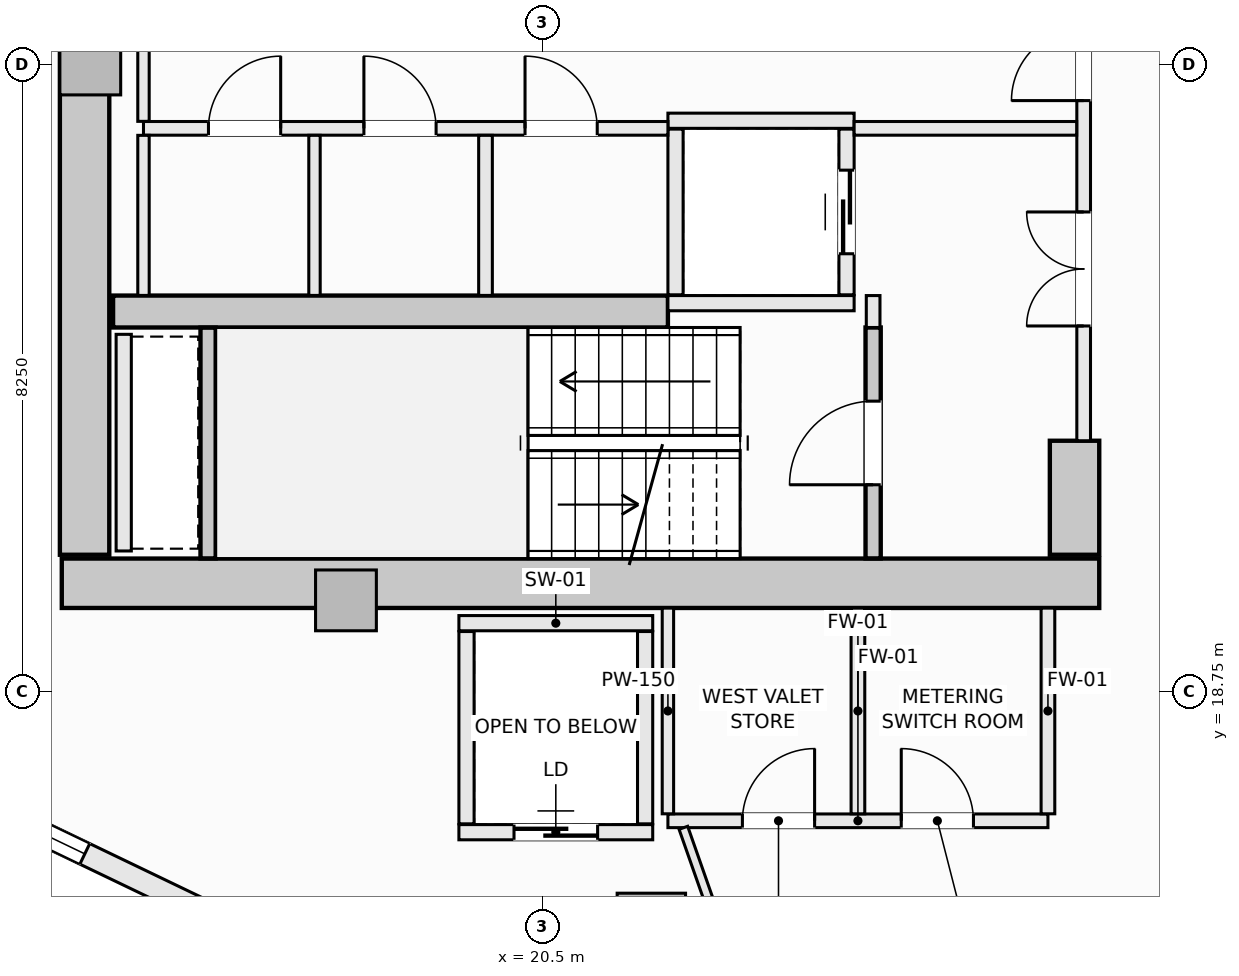
"""IFC4 building model, lengths in metres.
Left out: names, types, materials, properties, quantities, classifications, styles, units other than length and angle.
Written with IfcOpenShell. Run it as: python <this file> out.ifc"""

import sys

from ifc_helpers import new_model, si_unit, direction, frame, frame_2d, origin, origin_2d, place, context, subcontext, project, spatial, rectangle, extrude, element, fill, save


model = new_model("IFC4")
c1 = context("Model", 3, precision=1e-05, world=origin(), true_north=direction((0.0, 1.0)))
c2 = subcontext(c1, "Body", "Model", "MODEL_VIEW")
j1 = project(units=[si_unit("LENGTHUNIT", "METRE"), si_unit("PLANEANGLEUNIT", "RADIAN")], contexts=[c1])
p1 = place(None, origin())
s1 = spatial("IfcSite", under=j1, at=p1, CompositionType="ELEMENT")
p2 = place(p1, origin())
s2 = spatial("IfcBuilding", under=s1, at=p2, CompositionType="ELEMENT")
p3 = place(p2, frame((0.0, 0.0, 152.9)))
s3 = spatial("IfcBuildingStorey", under=s2, at=p3, CompositionType="ELEMENT", Elevation=152.9)
p4 = place(p3, frame((14.175, 20.175, -0.27), z_axis=(0.0, 0.0, 1.0), x_axis=(1.0, 0.0, 0.0)))
e1 = element("IfcWall", 1, at=p4, inside=s3, PredefinedType="SHEAR", context=c2, shape_type="SweptSolid", body=[
    extrude(rectangle(XDim=13.65, YDim=0.65, at=frame_2d((6.825, 0.0))), origin(), (0.0, 0.0, 1.0), 3.4),
])
p5 = place(p3, frame((14.475, 20.55, -0.27), z_axis=(0.0, 0.0, 1.0), x_axis=(0.0, 1.0, 0.0)))
e2 = element("IfcWall", 2, at=p5, inside=s3, PredefinedType="SHEAR", context=c2, shape_type="SweptSolid", body=[
    extrude(rectangle(XDim=12.9, YDim=0.65, at=frame_2d((6.45, 0.0))), origin(), (0.0, 0.0, 1.0), 3.4),
])
p6 = place(p3, frame((27.5, 20.55, -0.27), z_axis=(0.0, 0.0, 1.0), x_axis=(0.0, 1.0, 0.0)))
e3 = element("IfcWall", 3, at=p6, inside=s3, PredefinedType="SHEAR", context=c2, shape_type="SweptSolid", body=[
    extrude(rectangle(XDim=1.5, YDim=0.65, at=frame_2d((0.75, 0.0))), origin(), (0.0, 0.0, 1.0), 3.4),
])
p7 = place(p3, frame((14.85, 23.75, -0.27), z_axis=(0.0, 0.0, 1.0), x_axis=(1.0, 0.0, 0.0)))
e4 = element("IfcWall", 4, at=p7, inside=s3, PredefinedType="SHEAR", context=c2, shape_type="SweptSolid", body=[
    extrude(rectangle(XDim=7.3, YDim=0.42, at=frame_2d((3.65, 0.0))), origin(), (0.0, 0.0, 1.0), 3.4),
])
p8 = place(p3, frame((21.932, 15.648, -0.27), z_axis=(0.0, 0.0, 1.0), x_axis=(1.0, 0.0, 0.0)))
e5 = element("IfcColumn", 5, at=p8, inside=s3, PredefinedType="COLUMN", context=c2, shape_type="SweptSolid", body=[
    extrude(rectangle(XDim=0.9, YDim=0.9, at=origin_2d()), origin(), (0.0, 0.0, 1.0), 3.4),
])
for number, where, z_axis, x_axis in (
    (6, (14.55, 27.0, -0.27), (0.0, 0.0, 1.0), (1.0, 0.0, 0.0)),
    (7, (17.914, 19.95, -0.27), (0.0, 0.0, 1.0), (1.0, 0.0, 0.0)),
):
    element("IfcColumn", number, at=place(p3, frame(where, z_axis=z_axis, x_axis=x_axis)), inside=s3, PredefinedType="PILASTER", context=c2, shape_type="SweptSolid", body=[
        extrude(rectangle(XDim=0.8, YDim=0.8, at=origin_2d()), origin(), (0.0, 0.0, 1.0), 3.4),
    ])
p9 = place(p3, frame((11.127, 18.225, 0.0), z_axis=(0.0, 0.0, 1.0), x_axis=(0.901353070301, -0.433085029363, 0.0)))
e8 = element("IfcWall", 8, at=p9, inside=s3, PredefinedType="SOLIDWALL", context=c2, shape_type="SweptSolid", body=[
    extrude(rectangle(XDim=5.336, YDim=0.3, at=frame_2d((2.668, 0.0))), origin(), (0.0, 0.0, 1.0), 2.653),
])
p10 = place(p9, frame((1.618, 0.0, 0.74)))
e9 = element("IfcOpeningElement", 9, at=p10, cuts=e8, PredefinedType="OPENING", context=c2, shape_type="SweptSolid", body=[
    extrude(rectangle(XDim=2.1, YDim=1.7, at=frame_2d((1.05, 0.85))), frame((0.0, 0.16, 0.0), z_axis=(0.0, -1.0, 0.0), x_axis=(1.0, 0.0, 0.0)), (0.0, 0.0, 1.0), 0.32),
])
p11 = place(p3, frame((24.85, 20.502, -0.27), z_axis=(0.0, 0.0, 1.0), x_axis=(0.0, 1.0, 0.0)))
e10 = element("IfcWall", 10, at=p11, inside=s3, PredefinedType="SHEAR", context=c2, shape_type="SweptSolid", body=[
    extrude(rectangle(XDim=3.038, YDim=0.2, at=frame_2d((1.519, 0.0))), origin(), (0.0, 0.0, 1.0), 3.4),
])
p12 = place(p11, frame((0.969, 0.0, 0.27)))
e11 = element("IfcOpeningElement", 11, at=p12, cuts=e10, PredefinedType="OPENING", context=c2, shape_type="SweptSolid", body=[
    extrude(rectangle(XDim=1.1, YDim=2.15, at=frame_2d((0.55, 1.075))), frame((0.0, 0.11, 0.0), z_axis=(0.0, -1.0, 0.0), x_axis=(1.0, 0.0, 0.0)), (0.0, 0.0, 1.0), 0.22),
])
p13 = place(p3, frame((16.1, 20.502, -0.27), z_axis=(0.0, 0.0, 1.0), x_axis=(0.0, 1.0, 0.0)))
e12 = element("IfcWall", 12, at=p13, inside=s3, PredefinedType="SHEAR", context=c2, shape_type="SweptSolid", body=[
    extrude(rectangle(XDim=3.036, YDim=0.2, at=frame_2d((1.518, 0.0))), origin(), (0.0, 0.0, 1.0), 3.4),
])
for number, where, z_axis, x_axis in (
    (13, (22.15, 26.26, 0.0), (0.0, 0.0, 1.0), (1.0, 0.0, 0.0)),
    (14, (22.15, 23.86, 0.0), (0.0, 0.0, 1.0), (1.0, 0.0, 0.0)),
):
    element("IfcWall", number, at=place(p3, frame(where, z_axis=z_axis, x_axis=x_axis)), inside=s3, PredefinedType="SOLIDWALL", context=c2, shape_type="SweptSolid", body=[
        extrude(rectangle(XDim=2.45, YDim=0.2, at=frame_2d((1.225, 0.0))), origin(), (0.0, 0.0, 1.0), 3.13),
    ])
p14 = place(p3, frame((22.25, 23.97, 0.0), z_axis=(0.0, 0.0, 1.0), x_axis=(0.0, 1.0, 0.0)))
e15 = element("IfcWall", 15, at=p14, inside=s3, PredefinedType="SOLIDWALL", context=c2, shape_type="SweptSolid", body=[
    extrude(rectangle(XDim=2.18, YDim=0.2, at=frame_2d((1.09, 0.0))), origin(), (0.0, 0.0, 1.0), 3.13),
])
p15 = place(p3, frame((24.5, 23.97, 0.0), z_axis=(0.0, 0.0, 1.0), x_axis=(0.0, 1.0, 0.0)))
e16 = element("IfcWall", 16, at=p15, inside=s3, PredefinedType="SOLIDWALL", context=c2, shape_type="SweptSolid", body=[
    extrude(rectangle(XDim=2.18, YDim=0.2, at=frame_2d((1.09, 0.0))), origin(), (0.0, 0.0, 1.0), 3.13),
])
p16 = place(p15, frame((0.54, 0.0, 0.0)))
e17 = element("IfcOpeningElement", 17, at=p16, cuts=e16, PredefinedType="OPENING", context=c2, shape_type="SweptSolid", body=[
    extrude(rectangle(XDim=1.1, YDim=2.2, at=frame_2d((0.55, 1.1))), frame((0.0, 0.11, 0.0), z_axis=(0.0, -1.0, 0.0), x_axis=(1.0, 0.0, 0.0)), (0.0, 0.0, 1.0), 0.22),
])
p17 = place(p3, frame((19.4, 19.65, 0.0), z_axis=(0.0, 0.0, 1.0), x_axis=(1.0, 0.0, 0.0)))
e18 = element("IfcWall", 18, at=p17, inside=s3, PredefinedType="SOLIDWALL", context=c2, shape_type="SweptSolid", body=[
    extrude(rectangle(XDim=2.55, YDim=0.2, at=frame_2d((1.275, 0.0))), origin(), (0.0, 0.0, 1.0), 3.13),
])
p18 = place(p3, frame((19.4, 16.9, 0.0), z_axis=(0.0, 0.0, 1.0), x_axis=(1.0, 0.0, 0.0)))
e19 = element("IfcWall", 19, at=p18, inside=s3, PredefinedType="SOLIDWALL", context=c2, shape_type="SweptSolid", body=[
    extrude(rectangle(XDim=2.55, YDim=0.2, at=frame_2d((1.275, 0.0))), origin(), (0.0, 0.0, 1.0), 3.13),
])
p19 = place(p18, frame((0.725, 0.0, 0.0)))
e20 = element("IfcOpeningElement", 20, at=p19, cuts=e19, PredefinedType="OPENING", context=c2, shape_type="SweptSolid", body=[
    extrude(rectangle(XDim=1.1, YDim=2.2, at=frame_2d((0.55, 1.1))), frame((0.0, 0.11, 0.0), z_axis=(0.0, -1.0, 0.0), x_axis=(1.0, 0.0, 0.0)), (0.0, 0.0, 1.0), 0.22),
])
for number, where, z_axis, x_axis in (
    (21, (19.5, 17.01, 0.0), (0.0, 0.0, 1.0), (0.0, 1.0, 0.0)),
    (22, (21.85, 17.01, 0.0), (0.0, 0.0, 1.0), (0.0, 1.0, 0.0)),
):
    element("IfcWall", number, at=place(p3, frame(where, z_axis=z_axis, x_axis=x_axis)), inside=s3, PredefinedType="SOLIDWALL", context=c2, shape_type="SweptSolid", body=[
        extrude(rectangle(XDim=2.53, YDim=0.2, at=frame_2d((1.265, 0.0))), origin(), (0.0, 0.0, 1.0), 3.13),
    ])
p20 = place(p3, frame((14.99, 20.6, 0.0), z_axis=(0.0, 0.0, 1.0), x_axis=(0.0, 1.0, 0.0)))
e23 = element("IfcWall", 23, at=p20, inside=s3, PredefinedType="SOLIDWALL", context=c2, shape_type="SweptSolid", body=[
    extrude(rectangle(XDim=2.85, YDim=0.2, at=frame_2d((1.425, 0.0))), origin(), (0.0, 0.0, 1.0), 3.13),
])
p21 = place(p3, frame((24.85, 23.54, 0.0), z_axis=(0.0, 0.0, 1.0), x_axis=(0.0, 1.0, 0.0)))
e24 = element("IfcWall", 24, at=p21, inside=s3, PredefinedType="SOLIDWALL", context=c2, shape_type="SweptSolid", body=[
    extrude(rectangle(XDim=0.42, YDim=0.18, at=frame_2d((0.21, 0.0))), origin(), (0.0, 0.0, 1.0), 3.13),
])
p22 = place(p3, frame((27.62, 22.05, 0.0), z_axis=(0.0, 0.0, 1.0), x_axis=(0.0, 1.0, 0.0)))
e25 = element("IfcWall", 25, at=p22, inside=s3, PredefinedType="SOLIDWALL", context=c2, shape_type="SweptSolid", body=[
    extrude(rectangle(XDim=9.9, YDim=0.18, at=frame_2d((4.95, 0.0))), origin(), (0.0, 0.0, 1.0), 3.13),
])
p23 = place(p22, frame((4.475, 0.0, 0.0)))
e26 = element("IfcOpeningElement", 26, at=p23, cuts=e25, PredefinedType="OPENING", context=c2, shape_type="SweptSolid", body=[
    extrude(rectangle(XDim=0.95, YDim=2.1, at=frame_2d((0.475, 1.05))), frame((0.0, 0.1, 0.0), z_axis=(0.0, -1.0, 0.0), x_axis=(1.0, 0.0, 0.0)), (0.0, 0.0, 1.0), 0.2),
])
p24 = place(p22, frame((6.89, 0.0, 0.0)))
e27 = element("IfcOpeningElement", 27, at=p24, cuts=e25, PredefinedType="OPENING", context=c2, shape_type="SweptSolid", body=[
    extrude(rectangle(XDim=1.5, YDim=2.2, at=frame_2d((0.75, 1.1))), frame((0.0, 0.1, 0.0), z_axis=(0.0, -1.0, 0.0), x_axis=(1.0, 0.0, 0.0)), (0.0, 0.0, 1.0), 0.2),
])
p25 = place(p22, frame((1.51, 0.0, 0.0)))
e28 = element("IfcOpeningElement", 28, at=p25, cuts=e25, PredefinedType="OPENING", context=c2, shape_type="SweptSolid", body=[
    extrude(rectangle(XDim=1.5, YDim=2.2, at=frame_2d((0.75, 1.1))), frame((0.0, 0.1, 0.0), z_axis=(0.0, -1.0, 0.0), x_axis=(1.0, 0.0, 0.0)), (0.0, 0.0, 1.0), 0.2),
])
p26 = place(p3, frame((15.25, 26.16, 0.0), z_axis=(0.0, 0.0, 1.0), x_axis=(1.0, 0.0, 0.0)))
e29 = element("IfcWall", 29, at=p26, inside=s3, PredefinedType="SOLIDWALL", context=c2, shape_type="SweptSolid", body=[
    extrude(rectangle(XDim=6.9, YDim=0.18, at=frame_2d((3.45, 0.0))), origin(), (0.0, 0.0, 1.0), 3.13),
])
p27 = place(p26, frame((5.02, 0.0, 0.0)))
e30 = element("IfcOpeningElement", 30, at=p27, cuts=e29, PredefinedType="OPENING", context=c2, shape_type="SweptSolid", body=[
    extrude(rectangle(XDim=0.95, YDim=2.1, at=frame_2d((0.475, 1.05))), frame((0.0, 0.1, 0.0), z_axis=(0.0, -1.0, 0.0), x_axis=(1.0, 0.0, 0.0)), (0.0, 0.0, 1.0), 0.2),
])
p28 = place(p26, frame((0.855, 0.0, 0.0)))
e31 = element("IfcOpeningElement", 31, at=p28, cuts=e29, PredefinedType="OPENING", context=c2, shape_type="SweptSolid", body=[
    extrude(rectangle(XDim=0.95, YDim=2.1, at=frame_2d((0.475, 1.05))), frame((0.0, 0.1, 0.0), z_axis=(0.0, -1.0, 0.0), x_axis=(1.0, 0.0, 0.0)), (0.0, 0.0, 1.0), 0.2),
])
p29 = place(p26, frame((2.9, 0.0, 0.0)))
e32 = element("IfcOpeningElement", 32, at=p29, cuts=e29, PredefinedType="OPENING", context=c2, shape_type="SweptSolid", body=[
    extrude(rectangle(XDim=0.95, YDim=2.1, at=frame_2d((0.475, 1.05))), frame((0.0, 0.1, 0.0), z_axis=(0.0, -1.0, 0.0), x_axis=(1.0, 0.0, 0.0)), (0.0, 0.0, 1.0), 0.2),
])
p30 = place(p3, frame((24.6, 26.16, 0.0), z_axis=(0.0, 0.0, 1.0), x_axis=(1.0, 0.0, 0.0)))
e33 = element("IfcWall", 33, at=p30, inside=s3, PredefinedType="SOLIDWALL", context=c2, shape_type="SweptSolid", body=[
    extrude(rectangle(XDim=2.928, YDim=0.18, at=frame_2d((1.464, 0.0))), origin(), (0.0, 0.0, 1.0), 3.13),
])
p31 = place(p3, frame((15.25, 23.962, 0.0), z_axis=(0.0, 0.0, 1.0), x_axis=(0.0, 1.0, 0.0)))
e34 = element("IfcWall", 34, at=p31, inside=s3, PredefinedType="PARTITIONING", context=c2, shape_type="SweptSolid", body=[
    extrude(rectangle(XDim=2.106, YDim=0.15, at=frame_2d((1.053, 0.0))), origin(), (0.0, 0.0, 1.0), 3.13),
])
p32 = place(p3, frame((15.25, 26.252, 0.0), z_axis=(0.0, 0.0, 1.0), x_axis=(0.0, 1.0, 0.0)))
e35 = element("IfcWall", 35, at=p32, inside=s3, PredefinedType="PARTITIONING", context=c2, shape_type="SweptSolid", body=[
    extrude(rectangle(XDim=1.496, YDim=0.15, at=frame_2d((0.748, 0.0))), origin(), (0.0, 0.0, 1.0), 3.13),
])
p33 = place(p3, frame((19.75, 23.962, 0.0), z_axis=(0.0, 0.0, 1.0), x_axis=(0.0, 1.0, 0.0)))
e36 = element("IfcWall", 36, at=p33, inside=s3, PredefinedType="SOLIDWALL", context=c2, shape_type="SweptSolid", body=[
    extrude(rectangle(XDim=2.106, YDim=0.18, at=frame_2d((1.053, 0.0))), origin(), (0.0, 0.0, 1.0), 3.13),
])
p34 = place(p3, frame((17.5, 23.962, 0.0), z_axis=(0.0, 0.0, 1.0), x_axis=(0.0, 1.0, 0.0)))
e37 = element("IfcWall", 37, at=p34, inside=s3, PredefinedType="PARTITIONING", context=c2, shape_type="SweptSolid", body=[
    extrude(rectangle(XDim=2.106, YDim=0.15, at=frame_2d((1.053, 0.0))), origin(), (0.0, 0.0, 1.0), 3.13),
])
p35 = place(p3, frame((22.15, 17.05, 0.0), z_axis=(0.0, 0.0, 1.0), x_axis=(1.0, 0.0, 0.0)))
e38 = element("IfcWall", 38, at=p35, inside=s3, PredefinedType="SOLIDWALL", context=c2, shape_type="SweptSolid", body=[
    extrude(rectangle(XDim=5.0, YDim=0.18, at=frame_2d((2.5, 0.0))), origin(), (0.0, 0.0, 1.0), 3.13),
])
p36 = place(p35, frame((0.98, 0.0, 0.0)))
e39 = element("IfcOpeningElement", 39, at=p36, cuts=e38, PredefinedType="OPENING", context=c2, shape_type="SweptSolid", body=[
    extrude(rectangle(XDim=0.95, YDim=2.1, at=frame_2d((0.475, 1.05))), frame((0.0, 0.1, 0.0), z_axis=(0.0, -1.0, 0.0), x_axis=(1.0, 0.0, 0.0)), (0.0, 0.0, 1.0), 0.2),
])
p37 = place(p35, frame((3.07, 0.0, 0.0)))
e40 = element("IfcOpeningElement", 40, at=p37, cuts=e38, PredefinedType="OPENING", context=c2, shape_type="SweptSolid", body=[
    extrude(rectangle(XDim=0.95, YDim=2.1, at=frame_2d((0.475, 1.05))), frame((0.0, 0.1, 0.0), z_axis=(0.0, -1.0, 0.0), x_axis=(1.0, 0.0, 0.0)), (0.0, 0.0, 1.0), 0.2),
])
p38 = place(p3, frame((22.15, 17.142, 0.0), z_axis=(0.0, 0.0, 1.0), x_axis=(0.0, 1.0, 0.0)))
e41 = element("IfcWall", 41, at=p38, inside=s3, PredefinedType="PARTITIONING", context=c2, shape_type="SweptSolid", body=[
    extrude(rectangle(XDim=2.706, YDim=0.15, at=frame_2d((1.353, 0.0))), origin(), (0.0, 0.0, 1.0), 3.13),
])
for number, where, z_axis, x_axis in (
    (42, (24.65, 17.142, 0.0), (0.0, 0.0, 1.0), (0.0, 1.0, 0.0)),
    (43, (27.15, 17.142, 0.0), (0.0, 0.0, 1.0), (0.0, 1.0, 0.0)),
):
    element("IfcWall", number, at=place(p3, frame(where, z_axis=z_axis, x_axis=x_axis)), inside=s3, PredefinedType="SOLIDWALL", context=c2, shape_type="SweptSolid", body=[
        extrude(rectangle(XDim=2.706, YDim=0.18, at=frame_2d((1.353, 0.0))), origin(), (0.0, 0.0, 1.0), 3.13),
    ])
p39 = place(p3, frame((22.353, 16.958, 0.0), z_axis=(0.0, 0.0, 1.0), x_axis=(0.331370038458, -0.943500873138, 0.0)))
e44 = element("IfcWall", 44, at=p39, inside=s3, PredefinedType="PARTITIONING", context=c2, shape_type="SweptSolid", body=[
    extrude(rectangle(XDim=1.216, YDim=0.12, at=frame_2d((0.608, 0.0))), origin(), (0.0, 0.0, 1.0), 3.13),
])
p40 = place(p10, origin())
e45 = element("IfcWindow", 45, at=p40, inside=s3, PartitioningType="SINGLE_PANEL", PredefinedType="WINDOW", context=c2, shape_type="SweptSolid", body=[
    extrude(rectangle(XDim=2.1, YDim=1.7, at=frame_2d((1.05, 0.85))), frame((0.0, 0.03, 0.0), z_axis=(0.0, -1.0, 0.0), x_axis=(1.0, 0.0, 0.0)), (0.0, 0.0, 1.0), 0.06),
])
fill(e9, e45)
p41 = place(p12, origin())
e46 = element("IfcDoor", 46, at=p41, inside=s3, OperationType="SINGLE_SWING_LEFT", PredefinedType="DOOR", context=c2, shape_type="SweptSolid", body=[
    extrude(rectangle(XDim=1.1, YDim=2.15, at=frame_2d((0.55, 1.075))), frame((0.0, 0.025, 0.0), z_axis=(0.0, -1.0, 0.0), x_axis=(1.0, 0.0, 0.0)), (0.0, 0.0, 1.0), 0.05),
])
fill(e11, e46)
p42 = place(p16, origin())
e47 = element("IfcDoor", 47, at=p42, inside=s3, OperationType="SLIDING_TO_LEFT", PredefinedType="DOOR", context=c2, shape_type="SweptSolid", body=[
    extrude(rectangle(XDim=1.1, YDim=2.2, at=frame_2d((0.55, 1.1))), frame((0.0, 0.025, 0.0), z_axis=(0.0, -1.0, 0.0), x_axis=(1.0, 0.0, 0.0)), (0.0, 0.0, 1.0), 0.05),
])
fill(e17, e47)
p43 = place(p19, origin())
e48 = element("IfcDoor", 48, at=p43, inside=s3, OperationType="SLIDING_TO_LEFT", PredefinedType="DOOR", context=c2, shape_type="SweptSolid", body=[
    extrude(rectangle(XDim=1.1, YDim=2.2, at=frame_2d((0.55, 1.1))), frame((0.0, 0.025, 0.0), z_axis=(0.0, -1.0, 0.0), x_axis=(1.0, 0.0, 0.0)), (0.0, 0.0, 1.0), 0.05),
])
fill(e20, e48)
p44 = place(p23, origin())
e49 = element("IfcDoor", 49, at=p44, inside=s3, OperationType="SINGLE_SWING_LEFT", PredefinedType="DOOR", context=c2, shape_type="SweptSolid", body=[
    extrude(rectangle(XDim=0.95, YDim=2.1, at=frame_2d((0.475, 1.05))), frame((0.0, 0.025, 0.0), z_axis=(0.0, -1.0, 0.0), x_axis=(1.0, 0.0, 0.0)), (0.0, 0.0, 1.0), 0.05),
])
fill(e26, e49)
p45 = place(p25, origin())
e50 = element("IfcDoor", 50, at=p45, inside=s3, OperationType="DOUBLE_DOOR_SINGLE_SWING", PredefinedType="DOOR", context=c2, shape_type="SweptSolid", body=[
    extrude(rectangle(XDim=1.5, YDim=2.2, at=frame_2d((0.75, 1.1))), frame((0.0, 0.025, 0.0), z_axis=(0.0, -1.0, 0.0), x_axis=(1.0, 0.0, 0.0)), (0.0, 0.0, 1.0), 0.05),
])
fill(e28, e50)
p46 = place(p27, origin())
e51 = element("IfcDoor", 51, at=p46, inside=s3, OperationType="SINGLE_SWING_LEFT", PredefinedType="DOOR", context=c2, shape_type="SweptSolid", body=[
    extrude(rectangle(XDim=0.95, YDim=2.1, at=frame_2d((0.475, 1.05))), frame((0.0, 0.025, 0.0), z_axis=(0.0, -1.0, 0.0), x_axis=(1.0, 0.0, 0.0)), (0.0, 0.0, 1.0), 0.05),
])
fill(e30, e51)
p47 = place(p28, origin())
e52 = element("IfcDoor", 52, at=p47, inside=s3, OperationType="SINGLE_SWING_RIGHT", PredefinedType="DOOR", context=c2, shape_type="SweptSolid", body=[
    extrude(rectangle(XDim=0.95, YDim=2.1, at=frame_2d((0.475, 1.05))), frame((0.0, 0.025, 0.0), z_axis=(0.0, -1.0, 0.0), x_axis=(1.0, 0.0, 0.0)), (0.0, 0.0, 1.0), 0.05),
])
fill(e31, e52)
p48 = place(p29, origin())
e53 = element("IfcDoor", 53, at=p48, inside=s3, OperationType="SINGLE_SWING_LEFT", PredefinedType="DOOR", context=c2, shape_type="SweptSolid", body=[
    extrude(rectangle(XDim=0.95, YDim=2.1, at=frame_2d((0.475, 1.05))), frame((0.0, 0.025, 0.0), z_axis=(0.0, -1.0, 0.0), x_axis=(1.0, 0.0, 0.0)), (0.0, 0.0, 1.0), 0.05),
])
fill(e32, e53)
p49 = place(p36, origin())
e54 = element("IfcDoor", 54, at=p49, inside=s3, OperationType="SINGLE_SWING_RIGHT", PredefinedType="DOOR", context=c2, shape_type="SweptSolid", body=[
    extrude(rectangle(XDim=0.95, YDim=2.1, at=frame_2d((0.475, 1.05))), frame((0.0, 0.025, 0.0), z_axis=(0.0, -1.0, 0.0), x_axis=(1.0, 0.0, 0.0)), (0.0, 0.0, 1.0), 0.05),
])
fill(e39, e54)
p50 = place(p37, origin())
e55 = element("IfcDoor", 55, at=p50, inside=s3, OperationType="SINGLE_SWING_LEFT", PredefinedType="DOOR", context=c2, shape_type="SweptSolid", body=[
    extrude(rectangle(XDim=0.95, YDim=2.1, at=frame_2d((0.475, 1.05))), frame((0.0, 0.025, 0.0), z_axis=(0.0, -1.0, 0.0), x_axis=(1.0, 0.0, 0.0)), (0.0, 0.0, 1.0), 0.05),
])
fill(e40, e55)
save(model, sys.argv[1])
